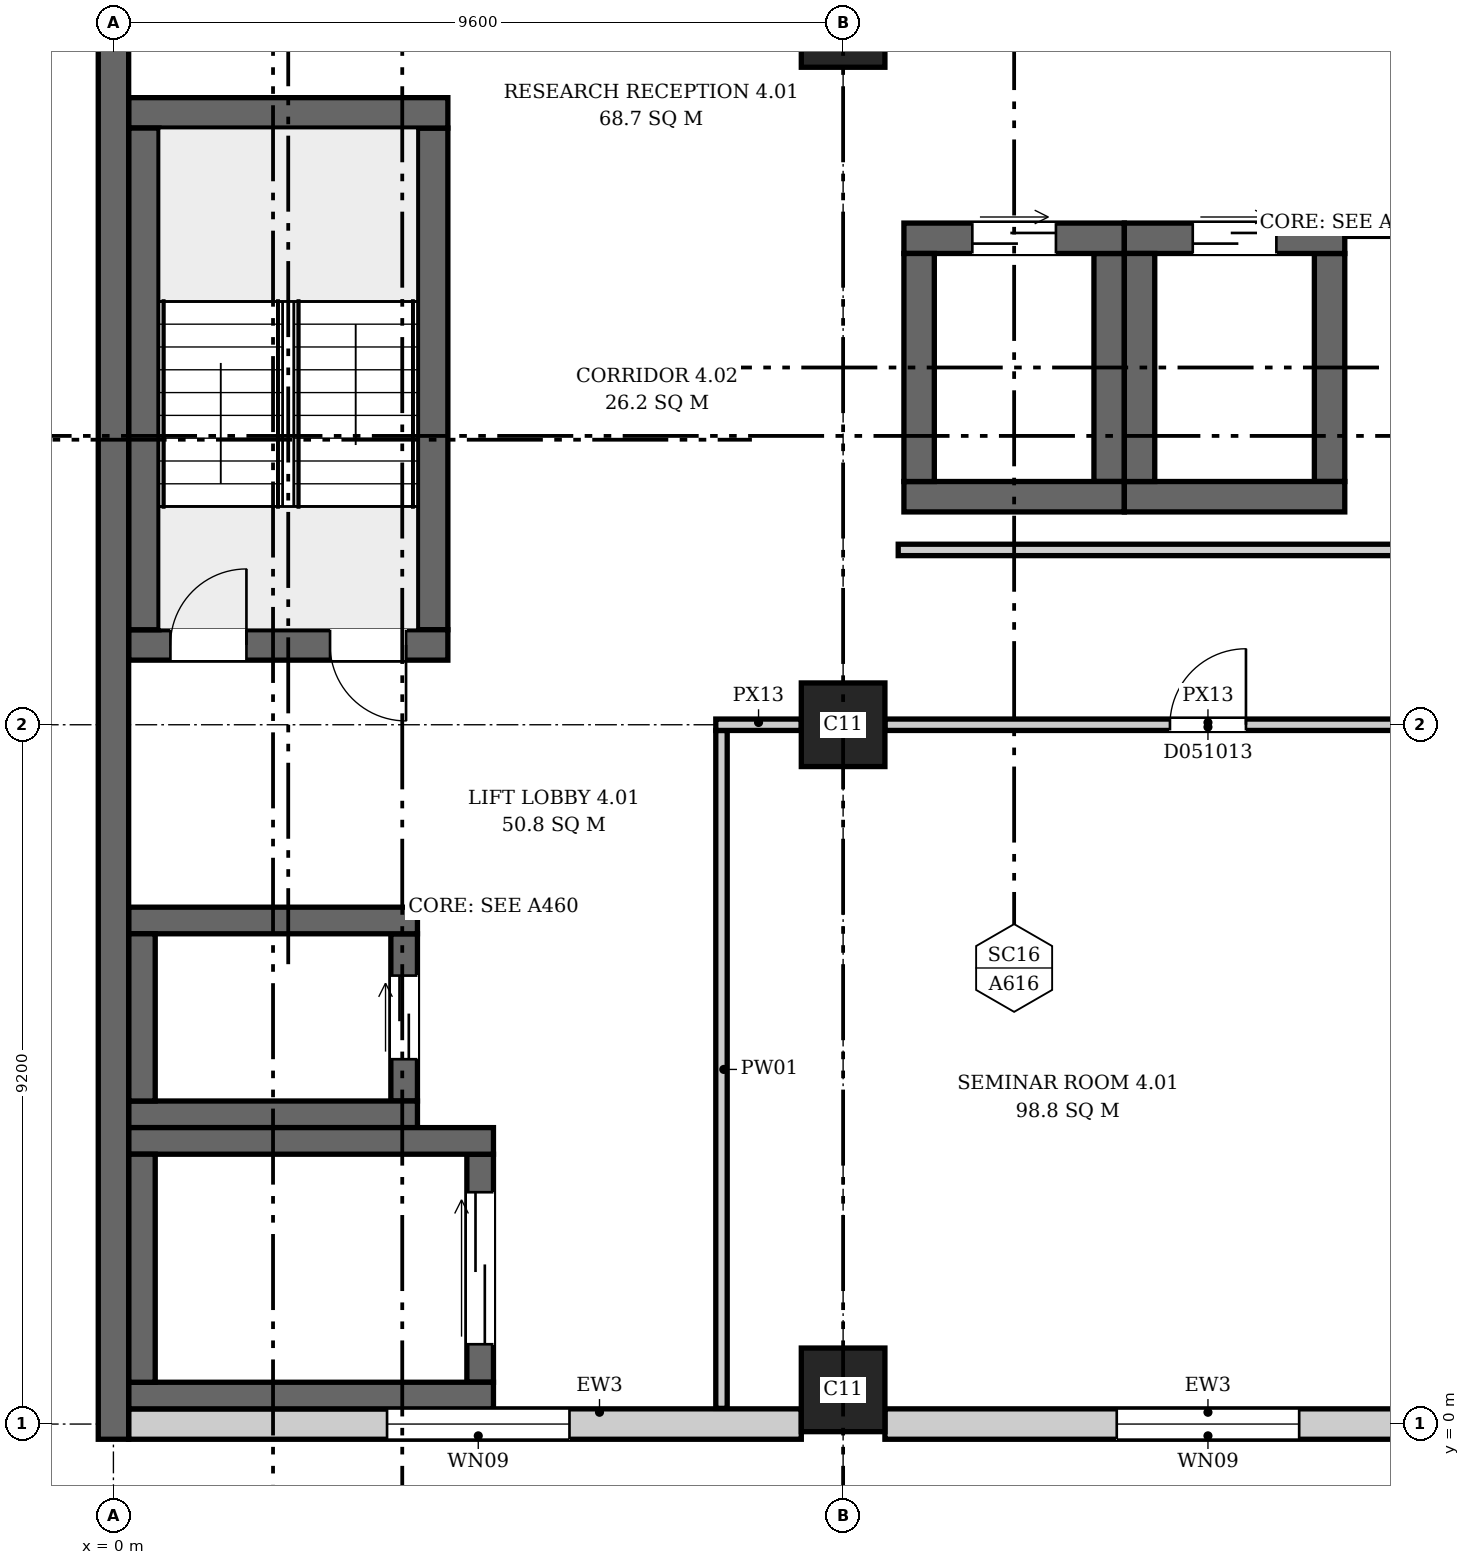
"""IFC4 building model, lengths in metres.
Left out: names, types, materials, properties, quantities, classifications, styles, units other than length and angle.
Written with IfcOpenShell. Run it as: python <this file> out.ifc"""

import sys

from ifc_helpers import new_model, si_unit, direction, frame, frame_2d, origin, origin_2d, place, context, subcontext, project, spatial, rectangle, extrude, element, fill, save


model = new_model("IFC4")
c1 = context("Model", 3, precision=1e-05, world=origin(), true_north=direction((0.0, 1.0)))
c2 = subcontext(c1, "Body", "Model", "MODEL_VIEW")
j1 = project(units=[si_unit("LENGTHUNIT", "METRE"), si_unit("PLANEANGLEUNIT", "RADIAN")], contexts=[c1])
p1 = place(None, origin())
s1 = spatial("IfcSite", under=j1, at=p1, CompositionType="ELEMENT")
p2 = place(p1, origin())
s2 = spatial("IfcBuilding", under=s1, at=p2, CompositionType="ELEMENT")
p3 = place(p2, frame((0.0, 0.0, 26.7)))
s3 = spatial("IfcBuildingStorey", under=s2, at=p3, CompositionType="ELEMENT", Elevation=26.7)
p4 = place(p3, frame((0.0, -0.2, 0.0), z_axis=(0.0, 0.0, 1.0), x_axis=(0.0, 1.0, 0.0)))
e1 = element("IfcWall", 1, at=p4, inside=s3, PredefinedType="SHEAR", context=c2, shape_type="SweptSolid", body=[
    extrude(rectangle(XDim=46.88, YDim=0.4, at=frame_2d((23.44, 0.0))), origin(), (0.0, 0.0, 1.0), 5.2),
])
p5 = place(p3, frame((0.2, 10.25, 0.0), z_axis=(0.0, 0.0, 1.0), x_axis=(1.0, 0.0, 0.0)))
e2 = element("IfcWall", 2, at=p5, inside=s3, PredefinedType="SHEAR", context=c2, shape_type="SweptSolid", body=[
    extrude(rectangle(XDim=4.2, YDim=0.4, at=frame_2d((2.1, 0.0))), origin(), (0.0, 0.0, 1.0), 5.2),
])
p6 = place(p5, frame((0.55, 0.0, 0.0)))
e3 = element("IfcOpeningElement", 3, at=p6, cuts=e2, PredefinedType="OPENING", context=c2, shape_type="SweptSolid", body=[
    extrude(rectangle(XDim=1.0, YDim=2.1, at=frame_2d((0.5, 1.05))), frame((0.0, 0.21, 0.0), z_axis=(0.0, -1.0, 0.0), x_axis=(1.0, 0.0, 0.0)), (0.0, 0.0, 1.0), 0.42),
])
p7 = place(p5, frame((2.65, 0.0, 0.0)))
e4 = element("IfcOpeningElement", 4, at=p7, cuts=e2, PredefinedType="OPENING", context=c2, shape_type="SweptSolid", body=[
    extrude(rectangle(XDim=1.0, YDim=2.1, at=frame_2d((0.5, 1.05))), frame((0.0, 0.21, 0.0), z_axis=(0.0, -1.0, 0.0), x_axis=(1.0, 0.0, 0.0)), (0.0, 0.0, 1.0), 0.42),
])
p8 = place(p3, frame((0.2, 17.25, 0.0), z_axis=(0.0, 0.0, 1.0), x_axis=(1.0, 0.0, 0.0)))
e5 = element("IfcWall", 5, at=p8, inside=s3, PredefinedType="SHEAR", context=c2, shape_type="SweptSolid", body=[
    extrude(rectangle(XDim=4.2, YDim=0.4, at=frame_2d((2.1, 0.0))), origin(), (0.0, 0.0, 1.0), 5.2),
])
for number, where, z_axis, x_axis in (
    (6, (0.4, 10.45, 0.0), (0.0, 0.0, 1.0), (0.0, 1.0, 0.0)),
    (7, (4.2, 10.45, 0.0), (0.0, 0.0, 1.0), (0.0, 1.0, 0.0)),
):
    element("IfcWall", number, at=place(p3, frame(where, z_axis=z_axis, x_axis=x_axis)), inside=s3, PredefinedType="SHEAR", context=c2, shape_type="SweptSolid", body=[
        extrude(rectangle(XDim=6.6, YDim=0.4, at=frame_2d((3.3, 0.0))), origin(), (0.0, 0.0, 1.0), 5.2),
    ])
for number, where, z_axis, x_axis in (
    (8, (0.2, 0.375, 0.0), (0.0, 0.0, 1.0), (1.0, 0.0, 0.0)),
    (9, (0.2, 3.725, 0.0), (0.0, 0.0, 1.0), (1.0, 0.0, 0.0)),
):
    element("IfcWall", number, at=place(p3, frame(where, z_axis=z_axis, x_axis=x_axis)), inside=s3, PredefinedType="SHEAR", context=c2, shape_type="SweptSolid", body=[
        extrude(rectangle(XDim=4.8, YDim=0.35, at=frame_2d((2.4, 0.0))), origin(), (0.0, 0.0, 1.0), 4.85),
    ])
p9 = place(p3, frame((0.375, 0.55, 0.0), z_axis=(0.0, 0.0, 1.0), x_axis=(0.0, 1.0, 0.0)))
e10 = element("IfcWall", 10, at=p9, inside=s3, PredefinedType="SHEAR", context=c2, shape_type="SweptSolid", body=[
    extrude(rectangle(XDim=3.0, YDim=0.35, at=frame_2d((1.5, 0.0))), origin(), (0.0, 0.0, 1.0), 4.85),
])
p10 = place(p3, frame((4.825, 0.55, 0.0), z_axis=(0.0, 0.0, 1.0), x_axis=(0.0, 1.0, 0.0)))
e11 = element("IfcWall", 11, at=p10, inside=s3, PredefinedType="SHEAR", context=c2, shape_type="SweptSolid", body=[
    extrude(rectangle(XDim=3.0, YDim=0.35, at=frame_2d((1.5, 0.0))), origin(), (0.0, 0.0, 1.0), 4.85),
])
p11 = place(p10, frame((0.5, 0.0, 0.0)))
e12 = element("IfcOpeningElement", 12, at=p11, cuts=e11, PredefinedType="OPENING", context=c2, shape_type="SweptSolid", body=[
    extrude(rectangle(XDim=2.0, YDim=2.4, at=frame_2d((1.0, 1.2))), frame((0.0, 0.185, 0.0), z_axis=(0.0, -1.0, 0.0), x_axis=(1.0, 0.0, 0.0)), (0.0, 0.0, 1.0), 0.37),
])
for number, where, z_axis, x_axis in (
    (13, (0.2, 4.075, 0.0), (0.0, 0.0, 1.0), (1.0, 0.0, 0.0)),
    (14, (0.2, 6.625, 0.0), (0.0, 0.0, 1.0), (1.0, 0.0, 0.0)),
):
    element("IfcWall", number, at=place(p3, frame(where, z_axis=z_axis, x_axis=x_axis)), inside=s3, PredefinedType="SHEAR", context=c2, shape_type="SweptSolid", body=[
        extrude(rectangle(XDim=3.8, YDim=0.35, at=frame_2d((1.9, 0.0))), origin(), (0.0, 0.0, 1.0), 4.85),
    ])
p12 = place(p3, frame((0.375, 4.25, 0.0), z_axis=(0.0, 0.0, 1.0), x_axis=(0.0, 1.0, 0.0)))
e15 = element("IfcWall", 15, at=p12, inside=s3, PredefinedType="SHEAR", context=c2, shape_type="SweptSolid", body=[
    extrude(rectangle(XDim=2.2, YDim=0.35, at=frame_2d((1.1, 0.0))), origin(), (0.0, 0.0, 1.0), 4.85),
])
p13 = place(p3, frame((3.825, 4.25, 0.0), z_axis=(0.0, 0.0, 1.0), x_axis=(0.0, 1.0, 0.0)))
e16 = element("IfcWall", 16, at=p13, inside=s3, PredefinedType="SHEAR", context=c2, shape_type="SweptSolid", body=[
    extrude(rectangle(XDim=2.2, YDim=0.35, at=frame_2d((1.1, 0.0))), origin(), (0.0, 0.0, 1.0), 4.85),
])
p14 = place(p13, frame((0.55, 0.0, 0.0)))
e17 = element("IfcOpeningElement", 17, at=p14, cuts=e16, PredefinedType="OPENING", context=c2, shape_type="SweptSolid", body=[
    extrude(rectangle(XDim=1.1, YDim=2.1, at=frame_2d((0.55, 1.05))), frame((0.0, 0.185, 0.0), z_axis=(0.0, -1.0, 0.0), x_axis=(1.0, 0.0, 0.0)), (0.0, 0.0, 1.0), 0.37),
])
p15 = place(p3, frame((10.4, 12.2, 0.0), z_axis=(0.0, 0.0, 1.0), x_axis=(1.0, 0.0, 0.0)))
e18 = element("IfcWall", 18, at=p15, inside=s3, PredefinedType="SHEAR", context=c2, shape_type="SweptSolid", body=[
    extrude(rectangle(XDim=2.9, YDim=0.4, at=frame_2d((1.45, 0.0))), origin(), (0.0, 0.0, 1.0), 5.2),
])
p16 = place(p3, frame((10.4, 15.6, 0.0), z_axis=(0.0, 0.0, 1.0), x_axis=(1.0, 0.0, 0.0)))
e19 = element("IfcWall", 19, at=p16, inside=s3, PredefinedType="SHEAR", context=c2, shape_type="SweptSolid", body=[
    extrude(rectangle(XDim=2.9, YDim=0.4, at=frame_2d((1.45, 0.0))), origin(), (0.0, 0.0, 1.0), 5.2),
])
p17 = place(p16, frame((0.9, 0.0, 0.0)))
e20 = element("IfcOpeningElement", 20, at=p17, cuts=e19, PredefinedType="OPENING", context=c2, shape_type="SweptSolid", body=[
    extrude(rectangle(XDim=1.1, YDim=2.1, at=frame_2d((0.55, 1.05))), frame((0.0, 0.21, 0.0), z_axis=(0.0, -1.0, 0.0), x_axis=(1.0, 0.0, 0.0)), (0.0, 0.0, 1.0), 0.42),
])
for number, where, z_axis, x_axis in (
    (21, (10.6, 12.4, 0.0), (0.0, 0.0, 1.0), (0.0, 1.0, 0.0)),
    (22, (13.1, 12.4, 0.0), (0.0, 0.0, 1.0), (0.0, 1.0, 0.0)),
):
    element("IfcWall", number, at=place(p3, frame(where, z_axis=z_axis, x_axis=x_axis)), inside=s3, PredefinedType="SHEAR", context=c2, shape_type="SweptSolid", body=[
        extrude(rectangle(XDim=3.0, YDim=0.4, at=frame_2d((1.5, 0.0))), origin(), (0.0, 0.0, 1.0), 5.2),
    ])
p18 = place(p3, frame((13.3, 12.2, 0.0), z_axis=(0.0, 0.0, 1.0), x_axis=(1.0, 0.0, 0.0)))
e23 = element("IfcWall", 23, at=p18, inside=s3, PredefinedType="SHEAR", context=c2, shape_type="SweptSolid", body=[
    extrude(rectangle(XDim=2.9, YDim=0.4, at=frame_2d((1.45, 0.0))), origin(), (0.0, 0.0, 1.0), 5.2),
])
p19 = place(p3, frame((13.3, 15.6, 0.0), z_axis=(0.0, 0.0, 1.0), x_axis=(1.0, 0.0, 0.0)))
e24 = element("IfcWall", 24, at=p19, inside=s3, PredefinedType="SHEAR", context=c2, shape_type="SweptSolid", body=[
    extrude(rectangle(XDim=2.9, YDim=0.4, at=frame_2d((1.45, 0.0))), origin(), (0.0, 0.0, 1.0), 5.2),
])
p20 = place(p19, frame((0.9, 0.0, 0.0)))
e25 = element("IfcOpeningElement", 25, at=p20, cuts=e24, PredefinedType="OPENING", context=c2, shape_type="SweptSolid", body=[
    extrude(rectangle(XDim=1.1, YDim=2.1, at=frame_2d((0.55, 1.05))), frame((0.0, 0.21, 0.0), z_axis=(0.0, -1.0, 0.0), x_axis=(1.0, 0.0, 0.0)), (0.0, 0.0, 1.0), 0.42),
])
for number, where, z_axis, x_axis in (
    (26, (13.5, 12.4, 0.0), (0.0, 0.0, 1.0), (0.0, 1.0, 0.0)),
    (27, (16.0, 12.4, 0.0), (0.0, 0.0, 1.0), (0.0, 1.0, 0.0)),
):
    element("IfcWall", number, at=place(p3, frame(where, z_axis=z_axis, x_axis=x_axis)), inside=s3, PredefinedType="SHEAR", context=c2, shape_type="SweptSolid", body=[
        extrude(rectangle(XDim=3.0, YDim=0.4, at=frame_2d((1.5, 0.0))), origin(), (0.0, 0.0, 1.0), 5.2),
    ])
for number, where, z_axis, x_axis in (
    (28, (9.6, 0.45, 0.0), (0.0, 0.0, 1.0), (1.0, 0.0, 0.0)),
    (29, (9.6, 9.2, 0.0), (0.0, 0.0, 1.0), (1.0, 0.0, 0.0)),
    (30, (9.6, 18.4, 0.0), (0.0, 0.0, 1.0), (1.0, 0.0, 0.0)),
):
    element("IfcColumn", number, at=place(p3, frame(where, z_axis=z_axis, x_axis=x_axis)), inside=s3, PredefinedType="COLUMN", context=c2, shape_type="SweptSolid", body=[
        extrude(rectangle(XDim=1.1, YDim=1.1, at=origin_2d()), origin(), (0.0, 0.0, 1.0), 5.2),
    ])
p21 = place(p3, frame((0.2, 0.0, 0.0), z_axis=(0.0, 0.0, 1.0), x_axis=(1.0, 0.0, 0.0)))
e31 = element("IfcWall", 31, at=p21, inside=s3, PredefinedType="ELEMENTEDWALL", context=c2, shape_type="SweptSolid", body=[
    extrude(rectangle(XDim=8.85, YDim=0.4, at=frame_2d((4.425, 0.0))), origin(), (0.0, 0.0, 1.0), 4.85),
])
p22 = place(p21, frame((3.4, 0.0, 1.0)))
e32 = element("IfcOpeningElement", 32, at=p22, cuts=e31, PredefinedType="OPENING", context=c2, shape_type="SweptSolid", body=[
    extrude(rectangle(XDim=2.4, YDim=2.2, at=frame_2d((1.2, 1.1))), frame((0.0, 0.21, 0.0), z_axis=(0.0, -1.0, 0.0), x_axis=(1.0, 0.0, 0.0)), (0.0, 0.0, 1.0), 0.42),
])
p23 = place(p3, frame((10.15, 0.0, 0.0), z_axis=(0.0, 0.0, 1.0), x_axis=(1.0, 0.0, 0.0)))
e33 = element("IfcWall", 33, at=p23, inside=s3, PredefinedType="ELEMENTEDWALL", context=c2, shape_type="SweptSolid", body=[
    extrude(rectangle(XDim=8.5, YDim=0.4, at=frame_2d((4.25, 0.0))), origin(), (0.0, 0.0, 1.0), 4.85),
])
p24 = place(p23, frame((3.05, 0.0, 1.0)))
e34 = element("IfcOpeningElement", 34, at=p24, cuts=e33, PredefinedType="OPENING", context=c2, shape_type="SweptSolid", body=[
    extrude(rectangle(XDim=2.4, YDim=2.2, at=frame_2d((1.2, 1.1))), frame((0.0, 0.21, 0.0), z_axis=(0.0, -1.0, 0.0), x_axis=(1.0, 0.0, 0.0)), (0.0, 0.0, 1.0), 0.42),
])
p25 = place(p3, frame((8.0, 0.206, 0.0), z_axis=(0.0, 0.0, 1.0), x_axis=(0.0, 1.0, 0.0)))
e35 = element("IfcWall", 35, at=p25, inside=s3, PredefinedType="PARTITIONING", context=c2, shape_type="SweptSolid", body=[
    extrude(rectangle(XDim=8.919, YDim=0.15, at=frame_2d((4.459, 0.0))), origin(), (0.0, 0.0, 1.0), 4.85),
])
p26 = place(p3, frame((7.925, 9.2, 0.0), z_axis=(0.0, 0.0, 1.0), x_axis=(1.0, 0.0, 0.0)))
e36 = element("IfcWall", 36, at=p26, inside=s3, PredefinedType="PARTITIONING", context=c2, shape_type="SweptSolid", body=[
    extrude(rectangle(XDim=1.125, YDim=0.15, at=frame_2d((0.562, 0.0))), origin(), (0.0, 0.0, 1.0), 4.45),
])
p27 = place(p3, frame((10.15, 9.2, 0.0), z_axis=(0.0, 0.0, 1.0), x_axis=(1.0, 0.0, 0.0)))
e37 = element("IfcWall", 37, at=p27, inside=s3, PredefinedType="PARTITIONING", context=c2, shape_type="SweptSolid", body=[
    extrude(rectangle(XDim=8.5, YDim=0.15, at=frame_2d((4.25, 0.0))), origin(), (0.0, 0.0, 1.0), 4.45),
])
p28 = place(p27, frame((3.75, 0.0, 0.0)))
e38 = element("IfcOpeningElement", 38, at=p28, cuts=e37, PredefinedType="OPENING", context=c2, shape_type="SweptSolid", body=[
    extrude(rectangle(XDim=1.0, YDim=2.1, at=frame_2d((0.5, 1.05))), frame((0.0, 0.085, 0.0), z_axis=(0.0, -1.0, 0.0), x_axis=(1.0, 0.0, 0.0)), (0.0, 0.0, 1.0), 0.17),
])
p29 = place(p3, frame((10.325, 11.5, 0.0), z_axis=(0.0, 0.0, 1.0), x_axis=(1.0, 0.0, 0.0)))
e39 = element("IfcWall", 39, at=p29, inside=s3, PredefinedType="PARTITIONING", context=c2, shape_type="SweptSolid", body=[
    extrude(rectangle(XDim=9.569, YDim=0.15, at=frame_2d((4.785, 0.0))), origin(), (0.0, 0.0, 1.0), 4.85),
])
p30 = place(p3, frame((16.206, 15.7, 0.0), z_axis=(0.0, 0.0, 1.0), x_axis=(1.0, 0.0, 0.0)))
e40 = element("IfcWall", 40, at=p30, inside=s3, PredefinedType="PARTITIONING", context=c2, shape_type="SweptSolid", body=[
    extrude(rectangle(XDim=3.688, YDim=0.15, at=frame_2d((1.844, 0.0))), origin(), (0.0, 0.0, 1.0), 4.85),
])
p31 = place(p22, origin())
e41 = element("IfcWindow", 41, at=p31, inside=s3, PartitioningType="SINGLE_PANEL", PredefinedType="WINDOW", context=c2, shape_type="SweptSolid", body=[
    extrude(rectangle(XDim=2.4, YDim=2.2, at=frame_2d((1.2, 1.1))), frame((0.0, 0.03, 0.0), z_axis=(0.0, -1.0, 0.0), x_axis=(1.0, 0.0, 0.0)), (0.0, 0.0, 1.0), 0.06),
])
fill(e32, e41)
p32 = place(p24, origin())
e42 = element("IfcWindow", 42, at=p32, inside=s3, PartitioningType="SINGLE_PANEL", PredefinedType="WINDOW", context=c2, shape_type="SweptSolid", body=[
    extrude(rectangle(XDim=2.4, YDim=2.2, at=frame_2d((1.2, 1.1))), frame((0.0, 0.03, 0.0), z_axis=(0.0, -1.0, 0.0), x_axis=(1.0, 0.0, 0.0)), (0.0, 0.0, 1.0), 0.06),
])
fill(e34, e42)
p33 = place(p6, origin())
e43 = element("IfcDoor", 43, at=p33, inside=s3, OperationType="SINGLE_SWING_RIGHT", PredefinedType="DOOR", context=c2, shape_type="SweptSolid", body=[
    extrude(rectangle(XDim=1.0, YDim=2.1, at=frame_2d((0.5, 1.05))), frame((0.0, 0.025, 0.0), z_axis=(0.0, -1.0, 0.0), x_axis=(1.0, 0.0, 0.0)), (0.0, 0.0, 1.0), 0.05),
])
fill(e3, e43)
p34 = place(p7, origin())
e44 = element("IfcDoor", 44, at=p34, inside=s3, OperationType="SINGLE_SWING_LEFT", PredefinedType="DOOR", context=c2, shape_type="SweptSolid", body=[
    extrude(rectangle(XDim=1.0, YDim=2.1, at=frame_2d((0.5, 1.05))), frame((0.0, 0.025, 0.0), z_axis=(0.0, -1.0, 0.0), x_axis=(1.0, 0.0, 0.0)), (0.0, 0.0, 1.0), 0.05),
])
fill(e4, e44)
p35 = place(p11, origin())
e45 = element("IfcDoor", 45, at=p35, inside=s3, OperationType="DOUBLE_DOOR_SLIDING", PredefinedType="DOOR", context=c2, shape_type="SweptSolid", body=[
    extrude(rectangle(XDim=2.0, YDim=2.4, at=frame_2d((1.0, 1.2))), frame((0.0, 0.025, 0.0), z_axis=(0.0, -1.0, 0.0), x_axis=(1.0, 0.0, 0.0)), (0.0, 0.0, 1.0), 0.05),
])
fill(e12, e45)
p36 = place(p14, origin())
e46 = element("IfcDoor", 46, at=p36, inside=s3, OperationType="DOUBLE_DOOR_SLIDING", PredefinedType="DOOR", context=c2, shape_type="SweptSolid", body=[
    extrude(rectangle(XDim=1.1, YDim=2.1, at=frame_2d((0.55, 1.05))), frame((0.0, 0.025, 0.0), z_axis=(0.0, -1.0, 0.0), x_axis=(1.0, 0.0, 0.0)), (0.0, 0.0, 1.0), 0.05),
])
fill(e17, e46)
p37 = place(p17, origin())
e47 = element("IfcDoor", 47, at=p37, inside=s3, OperationType="DOUBLE_DOOR_SLIDING", PredefinedType="DOOR", context=c2, shape_type="SweptSolid", body=[
    extrude(rectangle(XDim=1.1, YDim=2.1, at=frame_2d((0.55, 1.05))), frame((0.0, 0.025, 0.0), z_axis=(0.0, -1.0, 0.0), x_axis=(1.0, 0.0, 0.0)), (0.0, 0.0, 1.0), 0.05),
])
fill(e20, e47)
p38 = place(p20, origin())
e48 = element("IfcDoor", 48, at=p38, inside=s3, OperationType="DOUBLE_DOOR_SLIDING", PredefinedType="DOOR", context=c2, shape_type="SweptSolid", body=[
    extrude(rectangle(XDim=1.1, YDim=2.1, at=frame_2d((0.55, 1.05))), frame((0.0, 0.025, 0.0), z_axis=(0.0, -1.0, 0.0), x_axis=(1.0, 0.0, 0.0)), (0.0, 0.0, 1.0), 0.05),
])
fill(e25, e48)
p39 = place(p28, origin())
e49 = element("IfcDoor", 49, at=p39, inside=s3, OperationType="SINGLE_SWING_RIGHT", PredefinedType="DOOR", context=c2, shape_type="SweptSolid", body=[
    extrude(rectangle(XDim=1.0, YDim=2.1, at=frame_2d((0.5, 1.05))), frame((0.0, 0.025, 0.0), z_axis=(0.0, -1.0, 0.0), x_axis=(1.0, 0.0, 0.0)), (0.0, 0.0, 1.0), 0.05),
])
fill(e38, e49)
save(model, sys.argv[1])
